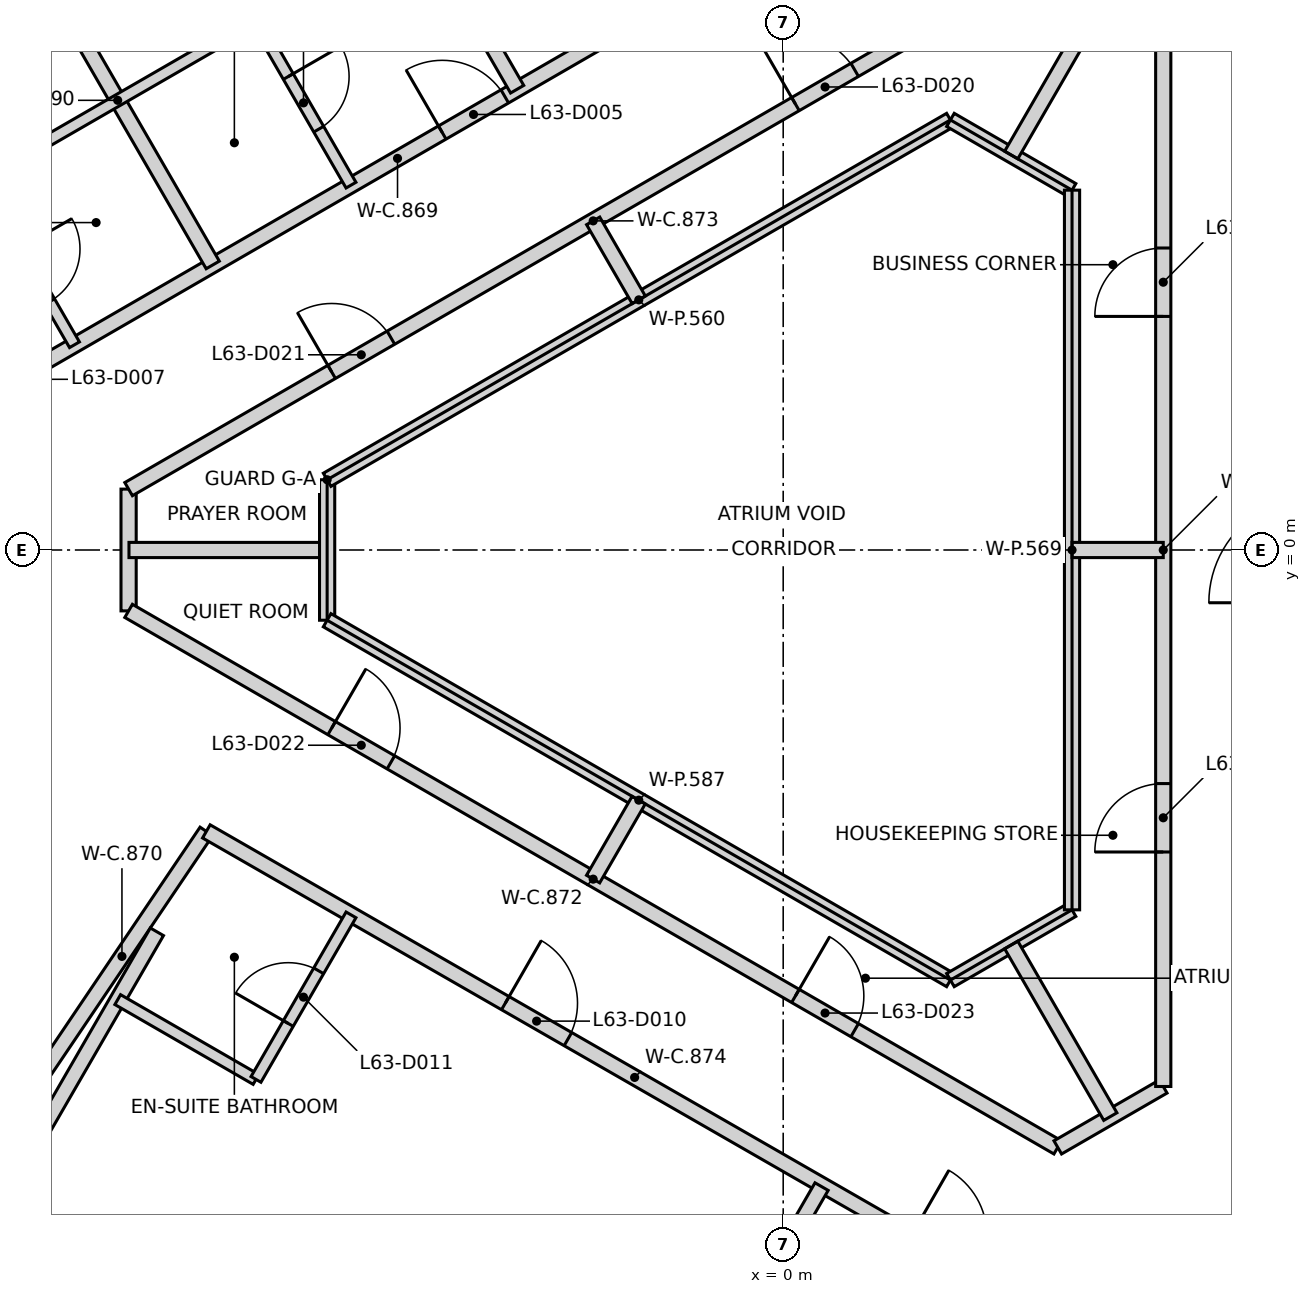
"""IFC4 building model, lengths in metres.
Left out: names, types, materials, properties, quantities, classifications, styles, units other than length and angle.
Written with IfcOpenShell. Run it as: python <this file> out.ifc"""

import sys

from ifc_helpers import new_model, si_unit, direction, frame, frame_2d, origin, place, context, subcontext, project, spatial, rectangle, extrude, element, fill, save


model = new_model("IFC4")
c1 = context("Model", 3, precision=1e-05, world=origin(), true_north=direction((0.0, 1.0)))
c2 = subcontext(c1, "Body", "Model", "MODEL_VIEW")
j1 = project(units=[si_unit("LENGTHUNIT", "METRE"), si_unit("PLANEANGLEUNIT", "RADIAN")], contexts=[c1])
p1 = place(None, origin())
s1 = spatial("IfcSite", under=j1, at=p1, CompositionType="ELEMENT")
p2 = place(p1, origin())
s2 = spatial("IfcBuilding", under=s1, at=p2, CompositionType="ELEMENT")
p3 = place(p2, frame((0.0, 0.0, 250.2)))
s3 = spatial("IfcBuildingStorey", under=s2, at=p3, CompositionType="ELEMENT", Elevation=250.2)
p4 = place(p3, frame((10.42, 6.498, 0.0), z_axis=(0.0, 0.0, 1.0), x_axis=(-0.866021906294, 0.500006057782, 0.0)))
e1 = element("IfcWall", 1, at=p4, inside=s3, PredefinedType="SHEAR", context=c2, shape_type="SweptSolid", body=[
    extrude(rectangle(XDim=11.55, YDim=0.25, at=frame_2d((5.775, 0.0))), origin(), (0.0, 0.0, 1.0), 3.25),
])
p5 = place(p4, frame((10.025, 0.0, 0.0)))
e2 = element("IfcOpeningElement", 2, at=p5, cuts=e1, PredefinedType="OPENING", context=c2, shape_type="SweptSolid", body=[
    extrude(rectangle(XDim=1.2, YDim=2.1, at=frame_2d((0.6, 1.05))), frame((0.0, 0.135, 0.0), z_axis=(0.0, -1.0, 0.0), x_axis=(1.0, 0.0, 0.0)), (0.0, 0.0, 1.0), 0.27),
])
p6 = place(p4, frame((8.725, 0.0, 0.0)))
e3 = element("IfcOpeningElement", 3, at=p6, cuts=e1, PredefinedType="OPENING", context=c2, shape_type="SweptSolid", body=[
    extrude(rectangle(XDim=1.2, YDim=2.1, at=frame_2d((0.6, 1.05))), frame((0.0, 0.135, 0.0), z_axis=(0.0, -1.0, 0.0), x_axis=(1.0, 0.0, 0.0)), (0.0, 0.0, 1.0), 0.27),
])
p7 = place(p3, frame((0.417, -12.273, 0.0), z_axis=(0.0, 0.0, 1.0), x_axis=(0.866021906294, 0.500006057782, 0.0)))
e4 = element("IfcWall", 4, at=p7, inside=s3, PredefinedType="SHEAR", context=c2, shape_type="SweptSolid", body=[
    extrude(rectangle(XDim=11.55, YDim=0.25, at=frame_2d((5.775, 0.0))), origin(), (0.0, 0.0, 1.0), 3.25),
])
p8 = place(p7, frame((10.025, 0.0, 0.0)))
e5 = element("IfcOpeningElement", 5, at=p8, cuts=e4, PredefinedType="OPENING", context=c2, shape_type="SweptSolid", body=[
    extrude(rectangle(XDim=1.2, YDim=2.1, at=frame_2d((0.6, 1.05))), frame((0.0, 0.135, 0.0), z_axis=(0.0, -1.0, 0.0), x_axis=(1.0, 0.0, 0.0)), (0.0, 0.0, 1.0), 0.27),
])
p9 = place(p7, frame((8.725, 0.0, 0.0)))
e6 = element("IfcOpeningElement", 6, at=p9, cuts=e4, PredefinedType="OPENING", context=c2, shape_type="SweptSolid", body=[
    extrude(rectangle(XDim=1.2, YDim=2.1, at=frame_2d((0.6, 1.05))), frame((0.0, 0.135, 0.0), z_axis=(0.0, -1.0, 0.0), x_axis=(1.0, 0.0, 0.0)), (0.0, 0.0, 1.0), 0.27),
])
p10 = place(p3, frame((-10.652, 1.928, 0.0), z_axis=(0.0, 0.0, 1.0), x_axis=(0.865793573301, 0.500401327367, 0.0)))
e7 = element("IfcWall", 7, at=p10, inside=s3, PredefinedType="PARTITIONING", context=c2, shape_type="SweptSolid", body=[
    extrude(rectangle(XDim=12.886, YDim=0.2, at=frame_2d((6.443, 0.0))), origin(), (0.0, 0.0, 1.0), 3.25),
])
p11 = place(p10, frame((7.123, 0.0, 0.0)))
e8 = element("IfcOpeningElement", 8, at=p11, cuts=e7, PredefinedType="OPENING", context=c2, shape_type="SweptSolid", body=[
    extrude(rectangle(XDim=0.95, YDim=2.1, at=frame_2d((0.475, 1.05))), frame((0.0, 0.11, 0.0), z_axis=(0.0, -1.0, 0.0), x_axis=(1.0, 0.0, 0.0)), (0.0, 0.0, 1.0), 0.22),
])
p12 = place(p10, frame((0.16, 0.0, 0.0)))
e9 = element("IfcOpeningElement", 9, at=p12, cuts=e7, PredefinedType="OPENING", context=c2, shape_type="SweptSolid", body=[
    extrude(rectangle(XDim=0.95, YDim=2.1, at=frame_2d((0.475, 1.05))), frame((0.0, 0.11, 0.0), z_axis=(0.0, -1.0, 0.0), x_axis=(1.0, 0.0, 0.0)), (0.0, 0.0, 1.0), 0.22),
])
p13 = place(p3, frame((-9.81, -6.991, 0.0), z_axis=(0.0, 0.0, 1.0), x_axis=(0.559616535009, 0.828751671941, 0.0)))
e10 = element("IfcWall", 10, at=p13, inside=s3, PredefinedType="PARTITIONING", context=c2, shape_type="SweptSolid", body=[
    extrude(rectangle(XDim=3.969, YDim=0.2, at=frame_2d((1.984, 0.0))), origin(), (0.0, 0.0, 1.0), 3.25),
])
p14 = place(p3, frame((-8.612, -0.801, 0.0), z_axis=(0.0, 0.0, 1.0), x_axis=(0.0, 1.0, 0.0)))
e11 = element("IfcWall", 11, at=p14, inside=s3, PredefinedType="PARTITIONING", context=c2, shape_type="SweptSolid", body=[
    extrude(rectangle(XDim=1.602, YDim=0.2, at=frame_2d((0.801, 0.0))), origin(), (0.0, 0.0, 1.0), 3.25),
])
p15 = place(p3, frame((-8.612, -0.801, 0.0), z_axis=(0.0, 0.0, 1.0), x_axis=(0.865998070783, -0.50004733916, 0.0)))
e12 = element("IfcWall", 12, at=p15, inside=s3, PredefinedType="PARTITIONING", context=c2, shape_type="SweptSolid", body=[
    extrude(rectangle(XDim=14.115, YDim=0.2, at=frame_2d((7.058, 0.0))), origin(), (0.0, 0.0, 1.0), 3.25),
])
p16 = place(p15, frame((3.085, 0.0, 0.0)))
e13 = element("IfcOpeningElement", 13, at=p16, cuts=e12, PredefinedType="OPENING", context=c2, shape_type="SweptSolid", body=[
    extrude(rectangle(XDim=0.9, YDim=2.1, at=frame_2d((0.45, 1.05))), frame((0.0, 0.11, 0.0), z_axis=(0.0, -1.0, 0.0), x_axis=(1.0, 0.0, 0.0)), (0.0, 0.0, 1.0), 0.22),
])
p17 = place(p15, frame((10.131, 0.0, 0.0)))
e14 = element("IfcOpeningElement", 14, at=p17, cuts=e12, PredefinedType="OPENING", context=c2, shape_type="SweptSolid", body=[
    extrude(rectangle(XDim=0.9, YDim=2.1, at=frame_2d((0.45, 1.05))), frame((0.0, 0.11, 0.0), z_axis=(0.0, -1.0, 0.0), x_axis=(1.0, 0.0, 0.0)), (0.0, 0.0, 1.0), 0.22),
])
p18 = place(p3, frame((-8.612, 0.801, 0.0), z_axis=(0.0, 0.0, 1.0), x_axis=(0.866005560651, 0.500034367741, 0.0)))
e15 = element("IfcWall", 15, at=p18, inside=s3, PredefinedType="PARTITIONING", context=c2, shape_type="SweptSolid", body=[
    extrude(rectangle(XDim=14.115, YDim=0.2, at=frame_2d((7.058, 0.0))), origin(), (0.0, 0.0, 1.0), 3.25),
])
p19 = place(p18, frame((10.131, 0.0, 0.0)))
e16 = element("IfcOpeningElement", 16, at=p19, cuts=e15, PredefinedType="OPENING", context=c2, shape_type="SweptSolid", body=[
    extrude(rectangle(XDim=0.9, YDim=2.1, at=frame_2d((0.45, 1.05))), frame((0.0, 0.11, 0.0), z_axis=(0.0, -1.0, 0.0), x_axis=(1.0, 0.0, 0.0)), (0.0, 0.0, 1.0), 0.22),
])
p20 = place(p18, frame((3.085, 0.0, 0.0)))
e17 = element("IfcOpeningElement", 17, at=p20, cuts=e15, PredefinedType="OPENING", context=c2, shape_type="SweptSolid", body=[
    extrude(rectangle(XDim=0.9, YDim=2.1, at=frame_2d((0.45, 1.05))), frame((0.0, 0.11, 0.0), z_axis=(0.0, -1.0, 0.0), x_axis=(1.0, 0.0, 0.0)), (0.0, 0.0, 1.0), 0.22),
])
p21 = place(p3, frame((-7.589, -3.702, 0.0), z_axis=(0.0, 0.0, 1.0), x_axis=(0.867107959402, -0.498120253293, 0.0)))
e18 = element("IfcWall", 18, at=p21, inside=s3, PredefinedType="PARTITIONING", context=c2, shape_type="SweptSolid", body=[
    extrude(rectangle(XDim=12.996, YDim=0.2, at=frame_2d((6.498, 0.0))), origin(), (0.0, 0.0, 1.0), 3.25),
])
p22 = place(p21, frame((4.536, 0.0, 0.0)))
e19 = element("IfcOpeningElement", 19, at=p22, cuts=e18, PredefinedType="OPENING", context=c2, shape_type="SweptSolid", body=[
    extrude(rectangle(XDim=0.95, YDim=2.1, at=frame_2d((0.475, 1.05))), frame((0.0, 0.11, 0.0), z_axis=(0.0, -1.0, 0.0), x_axis=(1.0, 0.0, 0.0)), (0.0, 0.0, 1.0), 0.22),
])
p23 = place(p21, frame((10.691, 0.0, 0.0)))
e20 = element("IfcOpeningElement", 20, at=p23, cuts=e18, PredefinedType="OPENING", context=c2, shape_type="SweptSolid", body=[
    extrude(rectangle(XDim=1.0, YDim=2.1, at=frame_2d((0.5, 1.05))), frame((0.0, 0.11, 0.0), z_axis=(0.0, -1.0, 0.0), x_axis=(1.0, 0.0, 0.0)), (0.0, 0.0, 1.0), 0.22),
])
p24 = place(p3, frame((3.612, -7.859, 0.0), z_axis=(0.0, 0.0, 1.0), x_axis=(0.866002901518, 0.500038973044, 0.0)))
e21 = element("IfcWall", 21, at=p24, inside=s3, PredefinedType="PARTITIONING", context=c2, shape_type="SweptSolid", body=[
    extrude(rectangle(XDim=1.602, YDim=0.2, at=frame_2d((0.801, 0.0))), origin(), (0.0, 0.0, 1.0), 3.25),
])
p25 = place(p3, frame((5.0, -7.058, 0.0), z_axis=(0.0, 0.0, 1.0), x_axis=(0.0, 1.0, 0.0)))
e22 = element("IfcWall", 22, at=p25, inside=s3, PredefinedType="PARTITIONING", context=c2, shape_type="SweptSolid", body=[
    extrude(rectangle(XDim=14.116, YDim=0.2, at=frame_2d((7.058, 0.0))), origin(), (0.0, 0.0, 1.0), 3.25),
])
p26 = place(p25, frame((3.085, 0.0, 0.0)))
e23 = element("IfcOpeningElement", 23, at=p26, cuts=e22, PredefinedType="OPENING", context=c2, shape_type="SweptSolid", body=[
    extrude(rectangle(XDim=0.9, YDim=2.1, at=frame_2d((0.45, 1.05))), frame((0.0, 0.11, 0.0), z_axis=(0.0, -1.0, 0.0), x_axis=(1.0, 0.0, 0.0)), (0.0, 0.0, 1.0), 0.22),
])
p27 = place(p25, frame((10.131, 0.0, 0.0)))
e24 = element("IfcOpeningElement", 24, at=p27, cuts=e22, PredefinedType="OPENING", context=c2, shape_type="SweptSolid", body=[
    extrude(rectangle(XDim=0.9, YDim=2.1, at=frame_2d((0.45, 1.05))), frame((0.0, 0.11, 0.0), z_axis=(0.0, -1.0, 0.0), x_axis=(1.0, 0.0, 0.0)), (0.0, 0.0, 1.0), 0.22),
])
p28 = place(p3, frame((-13.107, 13.453, 0.0), z_axis=(0.0, 0.0, 1.0), x_axis=(0.50003870279, -0.866003057565, 0.0)))
e25 = element("IfcWall", 25, at=p28, inside=s3, PredefinedType="PARTITIONING", context=c2, shape_type="SweptSolid", body=[
    extrude(rectangle(XDim=11.204, YDim=0.2, at=frame_2d((5.602, 0.0))), origin(), (0.0, 0.0, 1.0), 3.25),
])
p29 = place(p3, frame((-13.107, -13.453, 0.0), z_axis=(0.0, 0.0, 1.0), x_axis=(0.500058218288, 0.865991788831, 0.0)))
e26 = element("IfcWall", 26, at=p29, inside=s3, PredefinedType="PARTITIONING", context=c2, shape_type="SweptSolid", body=[
    extrude(rectangle(XDim=9.735, YDim=0.2, at=frame_2d((4.867, 0.0))), origin(), (0.0, 0.0, 1.0), 3.25),
])
p30 = place(p3, frame((-9.119, 15.795, 0.0), z_axis=(0.0, 0.0, 1.0), x_axis=(0.500015176972, -0.866016641178, 0.0)))
e27 = element("IfcWall", 27, at=p30, inside=s3, PredefinedType="PARTITIONING", context=c2, shape_type="SweptSolid", body=[
    extrude(rectangle(XDim=11.239, YDim=0.2, at=frame_2d((5.619, 0.0))), origin(), (0.0, 0.0, 1.0), 3.25),
])
p31 = place(p3, frame((-8.607, 0.0, 0.0), z_axis=(0.0, 0.0, 1.0), x_axis=(1.0, 0.0, 0.0)))
e28 = element("IfcWall", 28, at=p31, inside=s3, PredefinedType="PARTITIONING", context=c2, shape_type="SweptSolid", body=[
    extrude(rectangle(XDim=2.607, YDim=0.2, at=frame_2d((1.303, 0.0))), origin(), (0.0, 0.0, 1.0), 3.25),
])
p32 = place(p3, frame((-6.0, -0.924, 0.0), z_axis=(0.0, 0.0, 1.0), x_axis=(0.0, 1.0, 0.0)))
e29 = element("IfcWall", 29, at=p32, inside=s3, PredefinedType="PARTITIONING", context=c2, shape_type="SweptSolid", body=[
    extrude(rectangle(XDim=1.848, YDim=0.2, at=frame_2d((0.924, 0.0))), origin(), (0.0, 0.0, 1.0), 3.25),
])
for number, where, z_axis, x_axis in (
    (30, (-6.0, -0.924, 0.0), (0.0, 0.0, 1.0), (0.866, -0.5, 0.0)),
    (31, (-6.0, 0.924, 0.0), (0.0, 0.0, 1.0), (0.866, 0.5, 0.0)),
):
    element("IfcWall", number, at=place(p3, frame(where, z_axis=z_axis, x_axis=x_axis)), inside=s3, PredefinedType="PARTITIONING", context=c2, shape_type="SweptSolid", body=[
        extrude(rectangle(XDim=9.468, YDim=0.2, at=frame_2d((4.734, 0.0))), origin(), (0.0, 0.0, 1.0), 3.25),
    ])
p33 = place(p3, frame((-5.097, -18.078, 0.0), z_axis=(0.0, 0.0, 1.0), x_axis=(0.49996389635, 0.866046247233, 0.0)))
e32 = element("IfcWall", 32, at=p33, inside=s3, PredefinedType="PARTITIONING", context=c2, shape_type="SweptSolid", body=[
    extrude(rectangle(XDim=11.204, YDim=0.2, at=frame_2d((5.602, 0.0))), origin(), (0.0, 0.0, 1.0), 3.25),
])
for number, where, z_axis, x_axis in (
    (33, (-2.501, -4.329, 0.0), (0.0, 0.0, 1.0), (0.5, 0.866, 0.0)),
    (34, (-2.5, 4.33, 0.0), (0.0, 0.0, 1.0), (0.5, -0.866, 0.0)),
):
    element("IfcWall", number, at=place(p3, frame(where, z_axis=z_axis, x_axis=x_axis)), inside=s3, PredefinedType="PARTITIONING", context=c2, shape_type="SweptSolid", body=[
        extrude(rectangle(XDim=1.2, YDim=0.2, at=frame_2d((0.6, 0.0))), origin(), (0.0, 0.0, 1.0), 3.25),
    ])
for number, where, z_axis, x_axis in (
    (35, (2.2, -5.658, 0.0), (0.0, 0.0, 1.0), (0.866, 0.5, 0.0)),
    (36, (2.2, 5.658, 0.0), (0.0, 0.0, 1.0), (0.866, -0.5, 0.0)),
):
    element("IfcWall", number, at=place(p3, frame(where, z_axis=z_axis, x_axis=x_axis)), inside=s3, PredefinedType="PARTITIONING", context=c2, shape_type="SweptSolid", body=[
        extrude(rectangle(XDim=1.848, YDim=0.2, at=frame_2d((0.924, 0.0))), origin(), (0.0, 0.0, 1.0), 3.25),
    ])
for number, where, z_axis, x_axis in (
    (37, (3.0, 5.196, 0.0), (0.0, 0.0, 1.0), (0.5, 0.866, 0.0)),
    (38, (3.0, -5.196, 0.0), (0.0, 0.0, 1.0), (0.5, -0.866, 0.0)),
):
    element("IfcWall", number, at=place(p3, frame(where, z_axis=z_axis, x_axis=x_axis)), inside=s3, PredefinedType="PARTITIONING", context=c2, shape_type="SweptSolid", body=[
        extrude(rectangle(XDim=2.607, YDim=0.2, at=frame_2d((1.304, 0.0))), origin(), (0.0, 0.0, 1.0), 3.25),
    ])
p34 = place(p3, frame((3.8, -4.734, 0.0), z_axis=(0.0, 0.0, 1.0), x_axis=(0.0, 1.0, 0.0)))
e39 = element("IfcWall", 39, at=p34, inside=s3, PredefinedType="PARTITIONING", context=c2, shape_type="SweptSolid", body=[
    extrude(rectangle(XDim=9.468, YDim=0.2, at=frame_2d((4.734, 0.0))), origin(), (0.0, 0.0, 1.0), 3.25),
])
p35 = place(p3, frame((3.8, 0.0, 0.0), z_axis=(0.0, 0.0, 1.0), x_axis=(1.0, 0.0, 0.0)))
e40 = element("IfcWall", 40, at=p35, inside=s3, PredefinedType="PARTITIONING", context=c2, shape_type="SweptSolid", body=[
    extrude(rectangle(XDim=1.2, YDim=0.2, at=frame_2d((0.6, 0.0))), origin(), (0.0, 0.0, 1.0), 3.25),
])
p36 = place(p3, frame((-10.574, 4.866, 0.0), z_axis=(0.0, 0.0, 1.0), x_axis=(0.866052994476, 0.499952208475, 0.0)))
e41 = element("IfcWall", 41, at=p36, inside=s3, PredefinedType="PARTITIONING", context=c2, shape_type="SweptSolid", body=[
    extrude(rectangle(XDim=4.201, YDim=0.15, at=frame_2d((2.1, 0.0))), origin(), (0.0, 0.0, 1.0), 3.25),
])
p37 = place(p3, frame((-10.574, 4.865, 0.0), z_axis=(0.0, 0.0, 1.0), x_axis=(0.500004234368, -0.866022959057, 0.0)))
e42 = element("IfcWall", 42, at=p37, inside=s3, PredefinedType="PARTITIONING", context=c2, shape_type="SweptSolid", body=[
    extrude(rectangle(XDim=2.5, YDim=0.15, at=frame_2d((1.25, 0.0))), origin(), (0.0, 0.0, 1.0), 3.25),
])
p38 = place(p37, frame((1.045, 0.0, 0.0)))
e43 = element("IfcOpeningElement", 43, at=p38, cuts=e42, PredefinedType="OPENING", context=c2, shape_type="SweptSolid", body=[
    extrude(rectangle(XDim=0.8, YDim=2.1, at=frame_2d((0.4, 1.05))), frame((0.0, 0.085, 0.0), z_axis=(0.0, -1.0, 0.0), x_axis=(1.0, 0.0, 0.0)), (0.0, 0.0, 1.0), 0.17),
])
p39 = place(p3, frame((-8.755, -5.915, 0.0), z_axis=(0.0, 0.0, 1.0), x_axis=(0.866038466041, -0.499977374825, 0.0)))
e44 = element("IfcWall", 44, at=p39, inside=s3, PredefinedType="PARTITIONING", context=c2, shape_type="SweptSolid", body=[
    extrude(rectangle(XDim=2.1, YDim=0.15, at=frame_2d((1.05, 0.0))), origin(), (0.0, 0.0, 1.0), 3.25),
])
p40 = place(p3, frame((-6.936, -6.965, 0.0), z_axis=(0.0, 0.0, 1.0), x_axis=(0.500004234368, 0.866022959057, 0.0)))
e45 = element("IfcWall", 45, at=p40, inside=s3, PredefinedType="PARTITIONING", context=c2, shape_type="SweptSolid", body=[
    extrude(rectangle(XDim=2.5, YDim=0.15, at=frame_2d((1.25, 0.0))), origin(), (0.0, 0.0, 1.0), 3.25),
])
p41 = place(p40, frame((0.85, 0.0, 0.0)))
e46 = element("IfcOpeningElement", 46, at=p41, cuts=e45, PredefinedType="OPENING", context=c2, shape_type="SweptSolid", body=[
    extrude(rectangle(XDim=0.8, YDim=2.1, at=frame_2d((0.4, 1.05))), frame((0.0, 0.085, 0.0), z_axis=(0.0, -1.0, 0.0), x_axis=(1.0, 0.0, 0.0)), (0.0, 0.0, 1.0), 0.17),
])
p42 = place(p3, frame((-6.936, 6.965, 0.0), z_axis=(0.0, 0.0, 1.0), x_axis=(0.500004234368, -0.866022959057, 0.0)))
e47 = element("IfcWall", 47, at=p42, inside=s3, PredefinedType="PARTITIONING", context=c2, shape_type="SweptSolid", body=[
    extrude(rectangle(XDim=2.5, YDim=0.15, at=frame_2d((1.25, 0.0))), origin(), (0.0, 0.0, 1.0), 3.25),
])
p43 = place(p42, frame((0.85, 0.0, 0.0)))
e48 = element("IfcOpeningElement", 48, at=p43, cuts=e47, PredefinedType="OPENING", context=c2, shape_type="SweptSolid", body=[
    extrude(rectangle(XDim=0.8, YDim=2.1, at=frame_2d((0.4, 1.05))), frame((0.0, 0.085, 0.0), z_axis=(0.0, -1.0, 0.0), x_axis=(1.0, 0.0, 0.0)), (0.0, 0.0, 1.0), 0.17),
])
p44 = place(p11, origin())
e49 = element("IfcDoor", 49, at=p44, inside=s3, OperationType="SINGLE_SWING_LEFT", PredefinedType="DOOR", context=c2, shape_type="SweptSolid", body=[
    extrude(rectangle(XDim=0.95, YDim=2.1, at=frame_2d((0.475, 1.05))), frame((0.0, 0.025, 0.0), z_axis=(0.0, -1.0, 0.0), x_axis=(1.0, 0.0, 0.0)), (0.0, 0.0, 1.0), 0.05),
])
fill(e8, e49)
p45 = place(p43, origin())
e50 = element("IfcDoor", 50, at=p45, inside=s3, OperationType="SINGLE_SWING_LEFT", PredefinedType="DOOR", context=c2, shape_type="SweptSolid", body=[
    extrude(rectangle(XDim=0.8, YDim=2.1, at=frame_2d((0.4, 1.05))), frame((0.0, 0.025, 0.0), z_axis=(0.0, -1.0, 0.0), x_axis=(1.0, 0.0, 0.0)), (0.0, 0.0, 1.0), 0.05),
])
fill(e48, e50)
p46 = place(p22, frame((0.95, 0.0, 0.0), z_axis=(0.0, 0.0, 1.0), x_axis=(-1.0, 0.0, 0.0)))
e51 = element("IfcDoor", 51, at=p46, inside=s3, OperationType="SINGLE_SWING_LEFT", PredefinedType="DOOR", context=c2, shape_type="SweptSolid", body=[
    extrude(rectangle(XDim=0.95, YDim=2.1, at=frame_2d((0.475, 1.05))), frame((0.0, 0.025, 0.0), z_axis=(0.0, -1.0, 0.0), x_axis=(1.0, 0.0, 0.0)), (0.0, 0.0, 1.0), 0.05),
])
fill(e19, e51)
p47 = place(p41, frame((0.8, 0.0, 0.0), z_axis=(0.0, 0.0, 1.0), x_axis=(-1.0, 0.0, 0.0)))
e52 = element("IfcDoor", 52, at=p47, inside=s3, OperationType="SINGLE_SWING_LEFT", PredefinedType="DOOR", context=c2, shape_type="SweptSolid", body=[
    extrude(rectangle(XDim=0.8, YDim=2.1, at=frame_2d((0.4, 1.05))), frame((0.0, 0.025, 0.0), z_axis=(0.0, -1.0, 0.0), x_axis=(1.0, 0.0, 0.0)), (0.0, 0.0, 1.0), 0.05),
])
fill(e46, e52)
p48 = place(p26, origin())
e53 = element("IfcDoor", 53, at=p48, inside=s3, OperationType="SINGLE_SWING_LEFT", PredefinedType="DOOR", context=c2, shape_type="SweptSolid", body=[
    extrude(rectangle(XDim=0.9, YDim=2.1, at=frame_2d((0.45, 1.05))), frame((0.0, 0.025, 0.0), z_axis=(0.0, -1.0, 0.0), x_axis=(1.0, 0.0, 0.0)), (0.0, 0.0, 1.0), 0.05),
])
fill(e23, e53)
p49 = place(p27, origin())
e54 = element("IfcDoor", 54, at=p49, inside=s3, OperationType="SINGLE_SWING_LEFT", PredefinedType="DOOR", context=c2, shape_type="SweptSolid", body=[
    extrude(rectangle(XDim=0.9, YDim=2.1, at=frame_2d((0.45, 1.05))), frame((0.0, 0.025, 0.0), z_axis=(0.0, -1.0, 0.0), x_axis=(1.0, 0.0, 0.0)), (0.0, 0.0, 1.0), 0.05),
])
fill(e24, e54)
p50 = place(p19, frame((0.9, 0.0, 0.0), z_axis=(0.0, 0.0, 1.0), x_axis=(-1.0, 0.0, 0.0)))
e55 = element("IfcDoor", 55, at=p50, inside=s3, OperationType="SINGLE_SWING_LEFT", PredefinedType="DOOR", context=c2, shape_type="SweptSolid", body=[
    extrude(rectangle(XDim=0.9, YDim=2.1, at=frame_2d((0.45, 1.05))), frame((0.0, 0.025, 0.0), z_axis=(0.0, -1.0, 0.0), x_axis=(1.0, 0.0, 0.0)), (0.0, 0.0, 1.0), 0.05),
])
fill(e16, e55)
p51 = place(p20, frame((0.9, 0.0, 0.0), z_axis=(0.0, 0.0, 1.0), x_axis=(-1.0, 0.0, 0.0)))
e56 = element("IfcDoor", 56, at=p51, inside=s3, OperationType="SINGLE_SWING_LEFT", PredefinedType="DOOR", context=c2, shape_type="SweptSolid", body=[
    extrude(rectangle(XDim=0.9, YDim=2.1, at=frame_2d((0.45, 1.05))), frame((0.0, 0.025, 0.0), z_axis=(0.0, -1.0, 0.0), x_axis=(1.0, 0.0, 0.0)), (0.0, 0.0, 1.0), 0.05),
])
fill(e17, e56)
p52 = place(p16, origin())
e57 = element("IfcDoor", 57, at=p52, inside=s3, OperationType="SINGLE_SWING_LEFT", PredefinedType="DOOR", context=c2, shape_type="SweptSolid", body=[
    extrude(rectangle(XDim=0.9, YDim=2.1, at=frame_2d((0.45, 1.05))), frame((0.0, 0.025, 0.0), z_axis=(0.0, -1.0, 0.0), x_axis=(1.0, 0.0, 0.0)), (0.0, 0.0, 1.0), 0.05),
])
fill(e13, e57)
p53 = place(p17, origin())
e58 = element("IfcDoor", 58, at=p53, inside=s3, OperationType="SINGLE_SWING_LEFT", PredefinedType="DOOR", context=c2, shape_type="SweptSolid", body=[
    extrude(rectangle(XDim=0.9, YDim=2.1, at=frame_2d((0.45, 1.05))), frame((0.0, 0.025, 0.0), z_axis=(0.0, -1.0, 0.0), x_axis=(1.0, 0.0, 0.0)), (0.0, 0.0, 1.0), 0.05),
])
fill(e14, e58)
save(model, sys.argv[1])
